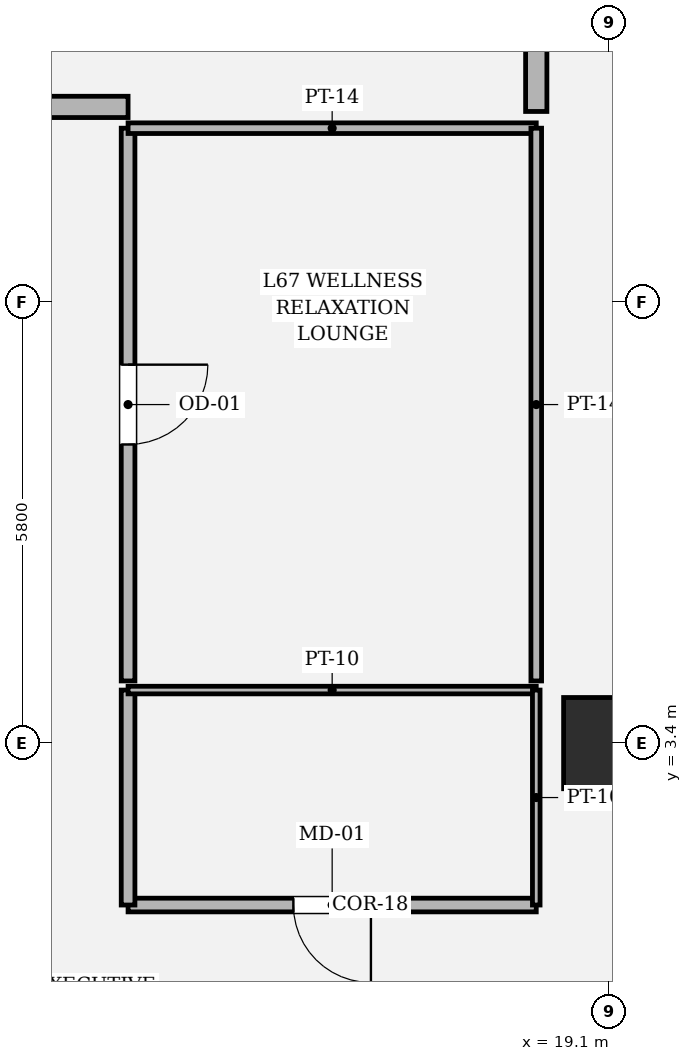
"""IFC4 building model, lengths in metres.
Left out: names, types, materials, properties, quantities, classifications, styles, units other than length and angle.
Written with IfcOpenShell. Run it as: python <this file> out.ifc"""

import sys

from ifc_helpers import new_model, si_unit, direction, frame, frame_2d, origin, origin_2d, place, context, subcontext, project, spatial, rectangle, hollow_rectangle, extrude, element, fill, save


model = new_model("IFC4")
c1 = context("Model", 3, precision=1e-05, world=origin(), true_north=direction((0.0, 1.0)))
c2 = subcontext(c1, "Body", "Model", "MODEL_VIEW")
j1 = project(units=[si_unit("LENGTHUNIT", "METRE"), si_unit("PLANEANGLEUNIT", "RADIAN")], contexts=[c1])
p1 = place(None, origin())
s1 = spatial("IfcSite", under=j1, at=p1, CompositionType="ELEMENT")
p2 = place(p1, origin())
s2 = spatial("IfcBuilding", under=s1, at=p2, CompositionType="ELEMENT")
p3 = place(p2, frame((0.0, 0.0, 283.8)))
s3 = spatial("IfcBuildingStorey", under=s2, at=p3, CompositionType="ELEMENT", Elevation=283.8)
p4 = place(p3, frame((19.1, 3.4, 0.0), z_axis=(0.0, 0.0, 1.0), x_axis=(1.0, 0.0, 0.0)))
e1 = element("IfcColumn", 1, at=p4, inside=s3, PredefinedType="COLUMN", context=c2, shape_type="SweptSolid", body=[
    extrude(hollow_rectangle(XDim=1.2, YDim=1.2, WallThickness=0.035, at=origin_2d()), origin(), (0.0, 0.0, 1.0), 4.2),
])
p5 = place(p3, frame((18.14, 1.27, 0.0), z_axis=(0.0, 0.0, 1.0), x_axis=(-1.0, 0.0, 0.0)))
e2 = element("IfcWall", 2, at=p5, inside=s3, PredefinedType="PARTITIONING", context=c2, shape_type="SweptSolid", body=[
    extrude(rectangle(XDim=5.37, YDim=0.18, at=frame_2d((2.685, 0.0))), origin(), (0.0, 0.0, 1.0), 4.0),
])
p6 = place(p5, frame((2.175, 0.0, 0.0)))
e3 = element("IfcOpeningElement", 3, at=p6, cuts=e2, PredefinedType="OPENING", context=c2, shape_type="SweptSolid", body=[
    extrude(rectangle(XDim=1.02, YDim=2.2, at=frame_2d((0.51, 1.1))), frame((0.0, 0.1, 0.0), z_axis=(0.0, -1.0, 0.0), x_axis=(1.0, 0.0, 0.0)), (0.0, 0.0, 1.0), 0.2),
])
p7 = place(p3, frame((12.77, 1.27, 0.0), z_axis=(0.0, 0.0, 1.0), x_axis=(0.0, 1.0, 0.0)))
e4 = element("IfcWall", 4, at=p7, inside=s3, PredefinedType="PARTITIONING", context=c2, shape_type="SweptSolid", body=[
    extrude(rectangle(XDim=2.828, YDim=0.18, at=frame_2d((1.414, 0.0))), origin(), (0.0, 0.0, 1.0), 3.394),
])
p8 = place(p3, frame((12.77, 4.098, 0.0), z_axis=(0.0, 0.0, 1.0), x_axis=(1.0, 0.0, 0.0)))
e5 = element("IfcWall", 5, at=p8, inside=s3, PredefinedType="PARTITIONING", context=c2, shape_type="SweptSolid", body=[
    extrude(rectangle(XDim=5.37, YDim=0.1, at=frame_2d((2.685, 0.0))), origin(), (0.0, 0.0, 1.0), 4.0),
])
p9 = place(p3, frame((18.14, 4.098, 0.0), z_axis=(0.0, 0.0, 1.0), x_axis=(0.0, -1.0, 0.0)))
e6 = element("IfcWall", 6, at=p9, inside=s3, PredefinedType="PARTITIONING", context=c2, shape_type="SweptSolid", body=[
    extrude(rectangle(XDim=2.828, YDim=0.1, at=frame_2d((1.414, 0.0))), origin(), (0.0, 0.0, 1.0), 3.394),
])
p10 = place(p3, frame((12.77, 4.218, 0.0), z_axis=(0.0, 0.0, 1.0), x_axis=(0.0, 1.0, 0.0)))
e7 = element("IfcWall", 7, at=p10, inside=s3, PredefinedType="PARTITIONING", context=c2, shape_type="SweptSolid", body=[
    extrude(rectangle(XDim=7.272, YDim=0.18, at=frame_2d((3.636, 0.0))), origin(), (0.0, 0.0, 1.0), 3.394),
])
p11 = place(p10, frame((3.111, 0.0, 0.0)))
e8 = element("IfcOpeningElement", 8, at=p11, cuts=e7, PredefinedType="OPENING", context=c2, shape_type="SweptSolid", body=[
    extrude(rectangle(XDim=1.05, YDim=2.2, at=frame_2d((0.525, 1.1))), frame((0.0, 0.1, 0.0), z_axis=(0.0, -1.0, 0.0), x_axis=(1.0, 0.0, 0.0)), (0.0, 0.0, 1.0), 0.2),
])
p12 = place(p3, frame((12.77, 11.49, 0.0), z_axis=(0.0, 0.0, 1.0), x_axis=(1.0, 0.0, 0.0)))
e9 = element("IfcWall", 9, at=p12, inside=s3, PredefinedType="PARTITIONING", context=c2, shape_type="SweptSolid", body=[
    extrude(rectangle(XDim=5.37, YDim=0.14, at=frame_2d((2.685, 0.0))), origin(), (0.0, 0.0, 1.0), 3.634),
])
p13 = place(p3, frame((18.14, 11.49, 0.0), z_axis=(0.0, 0.0, 1.0), x_axis=(0.0, -1.0, 0.0)))
e10 = element("IfcWall", 10, at=p13, inside=s3, PredefinedType="PARTITIONING", context=c2, shape_type="SweptSolid", body=[
    extrude(rectangle(XDim=7.272, YDim=0.14, at=frame_2d((3.636, 0.0))), origin(), (0.0, 0.0, 1.0), 3.394),
])
p14 = place(p3, frame((18.14, 22.44, 0.0), z_axis=(0.0, 0.0, 1.0), x_axis=(0.0, -1.0, 0.0)))
e11 = element("IfcWall", 11, at=p14, inside=s3, PredefinedType="SOLIDWALL", context=c2, shape_type="SweptSolid", body=[
    extrude(rectangle(XDim=10.73, YDim=0.28, at=frame_2d((5.365, 0.0))), origin(), (0.0, 0.0, 1.0), 3.394),
])
p15 = place(p3, frame((12.77, 11.77, 0.0), z_axis=(0.0, 0.0, 1.0), x_axis=(-1.0, 0.0, 0.0)))
e12 = element("IfcWall", 12, at=p15, inside=s3, PredefinedType="SOLIDWALL", context=c2, shape_type="SweptSolid", body=[
    extrude(rectangle(XDim=6.776, YDim=0.28, at=frame_2d((3.388, 0.0))), origin(), (0.0, 0.0, 1.0), 3.394),
])
p16 = place(p15, frame((2.538, 0.0, 0.0)))
e13 = element("IfcOpeningElement", 13, at=p16, cuts=e12, PredefinedType="OPENING", context=c2, shape_type="SweptSolid", body=[
    extrude(rectangle(XDim=1.7, YDim=2.3, at=frame_2d((0.85, 1.15))), frame((0.0, 0.15, 0.0), z_axis=(0.0, -1.0, 0.0), x_axis=(1.0, 0.0, 0.0)), (0.0, 0.0, 1.0), 0.3),
])
p17 = place(p6, origin())
e14 = element("IfcDoor", 14, at=p17, inside=s3, OperationType="SINGLE_SWING_LEFT", PredefinedType="DOOR", context=c2, shape_type="SweptSolid", body=[
    extrude(rectangle(XDim=1.02, YDim=2.2, at=frame_2d((0.51, 1.1))), frame((0.0, 0.025, 0.0), z_axis=(0.0, -1.0, 0.0), x_axis=(1.0, 0.0, 0.0)), (0.0, 0.0, 1.0), 0.05),
])
fill(e3, e14)
p18 = place(p11, origin())
e15 = element("IfcDoor", 15, at=p18, inside=s3, OperationType="SINGLE_SWING_RIGHT", PredefinedType="DOOR", context=c2, shape_type="SweptSolid", body=[
    extrude(rectangle(XDim=1.05, YDim=2.2, at=frame_2d((0.525, 1.1))), frame((0.0, 0.025, 0.0), z_axis=(0.0, -1.0, 0.0), x_axis=(1.0, 0.0, 0.0)), (0.0, 0.0, 1.0), 0.05),
])
fill(e8, e15)
save(model, sys.argv[1])
